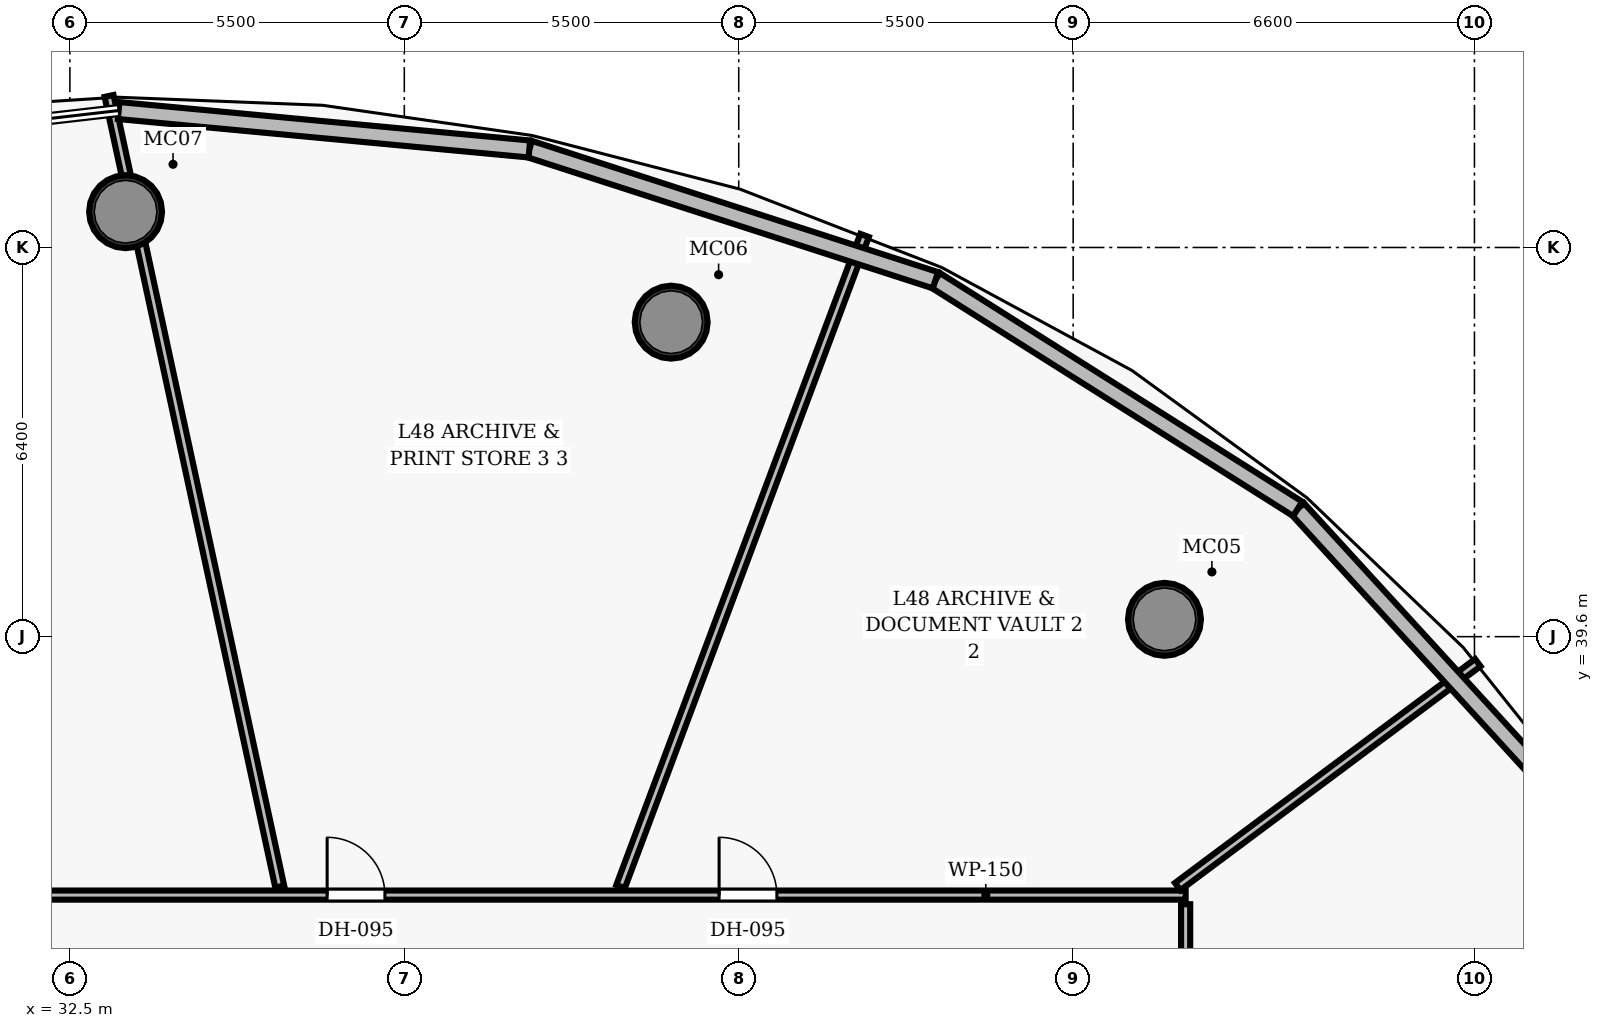
"""IFC4 building model, lengths in metres.
Left out: names, types, materials, properties, quantities, classifications, styles, units other than length and angle.
Written with IfcOpenShell. Run it as: python <this file> out.ifc"""

import sys

from ifc_helpers import new_model, si_unit, direction, frame, frame_2d, origin, origin_2d, place, context, subcontext, project, spatial, rectangle, hollow_circle, extrude, element, fill, save


model = new_model("IFC4")
c1 = context("Model", 3, precision=1e-05, world=origin(), true_north=direction((0.0, 1.0)))
c2 = subcontext(c1, "Body", "Model", "MODEL_VIEW")
j1 = project(units=[si_unit("LENGTHUNIT", "METRE"), si_unit("PLANEANGLEUNIT", "RADIAN")], contexts=[c1])
p1 = place(None, origin())
s1 = spatial("IfcSite", under=j1, at=p1, CompositionType="ELEMENT")
p2 = place(p1, origin())
s2 = spatial("IfcBuilding", under=s1, at=p2, CompositionType="ELEMENT")
p3 = place(p2, frame((0.0, 0.0, 190.45)))
s3 = spatial("IfcBuildingStorey", under=s2, at=p3, CompositionType="ELEMENT", Elevation=190.45)
for number, where, z_axis, x_axis in (
    (1, (50.502, 39.885, 0.0), (0.0, 0.0, 1.0), (1.0, 0.0, 0.0)),
    (2, (42.389, 44.772, 0.0), (0.0, 0.0, 1.0), (1.0, 0.0, 0.0)),
    (3, (33.416, 46.588, 0.0), (0.0, 0.0, 1.0), (1.0, 0.0, 0.0)),
):
    element("IfcColumn", number, at=place(p3, frame(where, z_axis=z_axis, x_axis=x_axis)), inside=s3, PredefinedType="COLUMN", context=c2, shape_type="SweptSolid", body=[
        extrude(hollow_circle(Radius=0.6, WallThickness=0.05, at=origin_2d()), origin(), (0.0, 0.0, 1.0), 3.85),
    ])
p4 = place(p3, frame((24.85, 35.35, 0.0), z_axis=(0.0, 0.0, 1.0), x_axis=(1.0, 0.0, 0.0)))
e4 = element("IfcWall", 4, at=p4, inside=s3, PredefinedType="PARTITIONING", context=c2, shape_type="SweptSolid", body=[
    extrude(rectangle(XDim=26.0, YDim=0.15, at=frame_2d((13.0, 0.0))), origin(), (0.0, 0.0, 1.0), 3.035),
])
p5 = place(p4, frame((18.327, 0.0, 0.0)))
e5 = element("IfcOpeningElement", 5, at=p5, cuts=e4, PredefinedType="OPENING", context=c2, shape_type="SweptSolid", body=[
    extrude(rectangle(XDim=0.95, YDim=2.15, at=frame_2d((0.475, 1.075))), frame((0.0, 0.085, 0.0), z_axis=(0.0, -1.0, 0.0), x_axis=(1.0, 0.0, 0.0)), (0.0, 0.0, 1.0), 0.17),
])
p6 = place(p4, frame((11.881, 0.0, 0.0)))
e6 = element("IfcOpeningElement", 6, at=p6, cuts=e4, PredefinedType="OPENING", context=c2, shape_type="SweptSolid", body=[
    extrude(rectangle(XDim=0.95, YDim=2.15, at=frame_2d((0.475, 1.075))), frame((0.0, 0.085, 0.0), z_axis=(0.0, -1.0, 0.0), x_axis=(1.0, 0.0, 0.0)), (0.0, 0.0, 1.0), 0.17),
])
p7 = place(p4, frame((5.711, 0.0, 0.0)))
e7 = element("IfcOpeningElement", 7, at=p7, cuts=e4, PredefinedType="OPENING", context=c2, shape_type="SweptSolid", body=[
    extrude(rectangle(XDim=0.95, YDim=2.15, at=frame_2d((0.475, 1.075))), frame((0.0, 0.085, 0.0), z_axis=(0.0, -1.0, 0.0), x_axis=(1.0, 0.0, 0.0)), (0.0, 0.0, 1.0), 0.17),
])
p8 = place(p3, frame((50.85, 27.08, 0.0), z_axis=(0.0, 0.0, 1.0), x_axis=(0.0, 1.0, 0.0)))
e8 = element("IfcWall", 8, at=p8, inside=s3, PredefinedType="PARTITIONING", context=c2, shape_type="SweptSolid", body=[
    extrude(rectangle(XDim=8.12, YDim=0.15, at=frame_2d((4.06, 0.0))), origin(), (0.0, 0.0, 1.0), 3.035),
])
p9 = place(p8, frame((1.555, 0.0, 0.0)))
e9 = element("IfcOpeningElement", 9, at=p9, cuts=e8, PredefinedType="OPENING", context=c2, shape_type="SweptSolid", body=[
    extrude(rectangle(XDim=0.95, YDim=2.15, at=frame_2d((0.475, 1.075))), frame((0.0, 0.085, 0.0), z_axis=(0.0, -1.0, 0.0), x_axis=(1.0, 0.0, 0.0)), (0.0, 0.0, 1.0), 0.17),
])
p10 = place(p3, frame((50.719, 35.49, 0.0), z_axis=(0.0, 0.0, 1.0), x_axis=(0.801486425079, 0.598012968433, 0.0)))
e10 = element("IfcWall", 10, at=p10, inside=s3, PredefinedType="PARTITIONING", context=c2, shape_type="SweptSolid", body=[
    extrude(rectangle(XDim=6.159, YDim=0.15, at=frame_2d((3.08, 0.0))), origin(), (0.0, 0.0, 1.0), 3.035),
])
p11 = place(p3, frame((41.557, 35.49, 0.0), z_axis=(0.0, 0.0, 1.0), x_axis=(0.350964338917, 0.936388825653, 0.0)))
e11 = element("IfcWall", 11, at=p11, inside=s3, PredefinedType="PARTITIONING", context=c2, shape_type="SweptSolid", body=[
    extrude(rectangle(XDim=11.436, YDim=0.15, at=frame_2d((5.718, 0.0))), origin(), (0.0, 0.0, 1.0), 3.035),
])
p12 = place(p3, frame((35.951, 35.49, 0.0), z_axis=(0.0, 0.0, 1.0), x_axis=(-0.211016689377, 0.977482458566, 0.0)))
e12 = element("IfcWall", 12, at=p12, inside=s3, PredefinedType="PARTITIONING", context=c2, shape_type="SweptSolid", body=[
    extrude(rectangle(XDim=13.302, YDim=0.15, at=frame_2d((6.651, 0.0))), origin(), (0.0, 0.0, 1.0), 3.035),
])
p13 = place(p3, frame((52.693, 41.702, 0.0), z_axis=(0.0, 0.0, 1.0), x_axis=(0.674996203947, -0.737821201008, 0.0)))
e13 = element("IfcWall", 13, at=p13, inside=s3, PredefinedType="SOLIDWALL", context=c2, shape_type="SweptSolid", body=[
    extrude(rectangle(XDim=7.045, YDim=0.28, at=frame_2d((3.523, 0.0))), origin(), (0.0, 0.0, 1.0), 3.62),
])
p14 = place(p3, frame((46.734, 45.462, 0.0), z_axis=(0.0, 0.0, 1.0), x_axis=(0.845697157584, -0.533663112511, 0.0)))
e14 = element("IfcWall", 14, at=p14, inside=s3, PredefinedType="SOLIDWALL", context=c2, shape_type="SweptSolid", body=[
    extrude(rectangle(XDim=7.046, YDim=0.28, at=frame_2d((3.523, 0.0))), origin(), (0.0, 0.0, 1.0), 3.62),
])
p15 = place(p3, frame((40.057, 47.62, 0.0), z_axis=(0.0, 0.0, 1.0), x_axis=(0.951544860773, -0.307509963964, 0.0)))
e15 = element("IfcWall", 15, at=p15, inside=s3, PredefinedType="SOLIDWALL", context=c2, shape_type="SweptSolid", body=[
    extrude(rectangle(XDim=7.018, YDim=0.28, at=frame_2d((3.509, 0.0))), origin(), (0.0, 0.0, 1.0), 3.62),
])
p16 = place(p3, frame((33.302, 48.252, 0.0), z_axis=(0.0, 0.0, 1.0), x_axis=(0.995647175429, -0.093202478833, 0.0)))
e16 = element("IfcWall", 16, at=p16, inside=s3, PredefinedType="SOLIDWALL", context=c2, shape_type="SweptSolid", body=[
    extrude(rectangle(XDim=6.784, YDim=0.28, at=frame_2d((3.392, 0.0))), origin(), (0.0, 0.0, 1.0), 3.62),
])
p17 = place(p5, origin())
e17 = element("IfcDoor", 17, at=p17, inside=s3, OperationType="SINGLE_SWING_LEFT", PredefinedType="DOOR", context=c2, shape_type="SweptSolid", body=[
    extrude(rectangle(XDim=0.95, YDim=2.15, at=frame_2d((0.475, 1.075))), frame((0.0, 0.025, 0.0), z_axis=(0.0, -1.0, 0.0), x_axis=(1.0, 0.0, 0.0)), (0.0, 0.0, 1.0), 0.05),
])
fill(e5, e17)
p18 = place(p6, origin())
e18 = element("IfcDoor", 18, at=p18, inside=s3, OperationType="SINGLE_SWING_LEFT", PredefinedType="DOOR", context=c2, shape_type="SweptSolid", body=[
    extrude(rectangle(XDim=0.95, YDim=2.15, at=frame_2d((0.475, 1.075))), frame((0.0, 0.025, 0.0), z_axis=(0.0, -1.0, 0.0), x_axis=(1.0, 0.0, 0.0)), (0.0, 0.0, 1.0), 0.05),
])
fill(e6, e18)
save(model, sys.argv[1])
